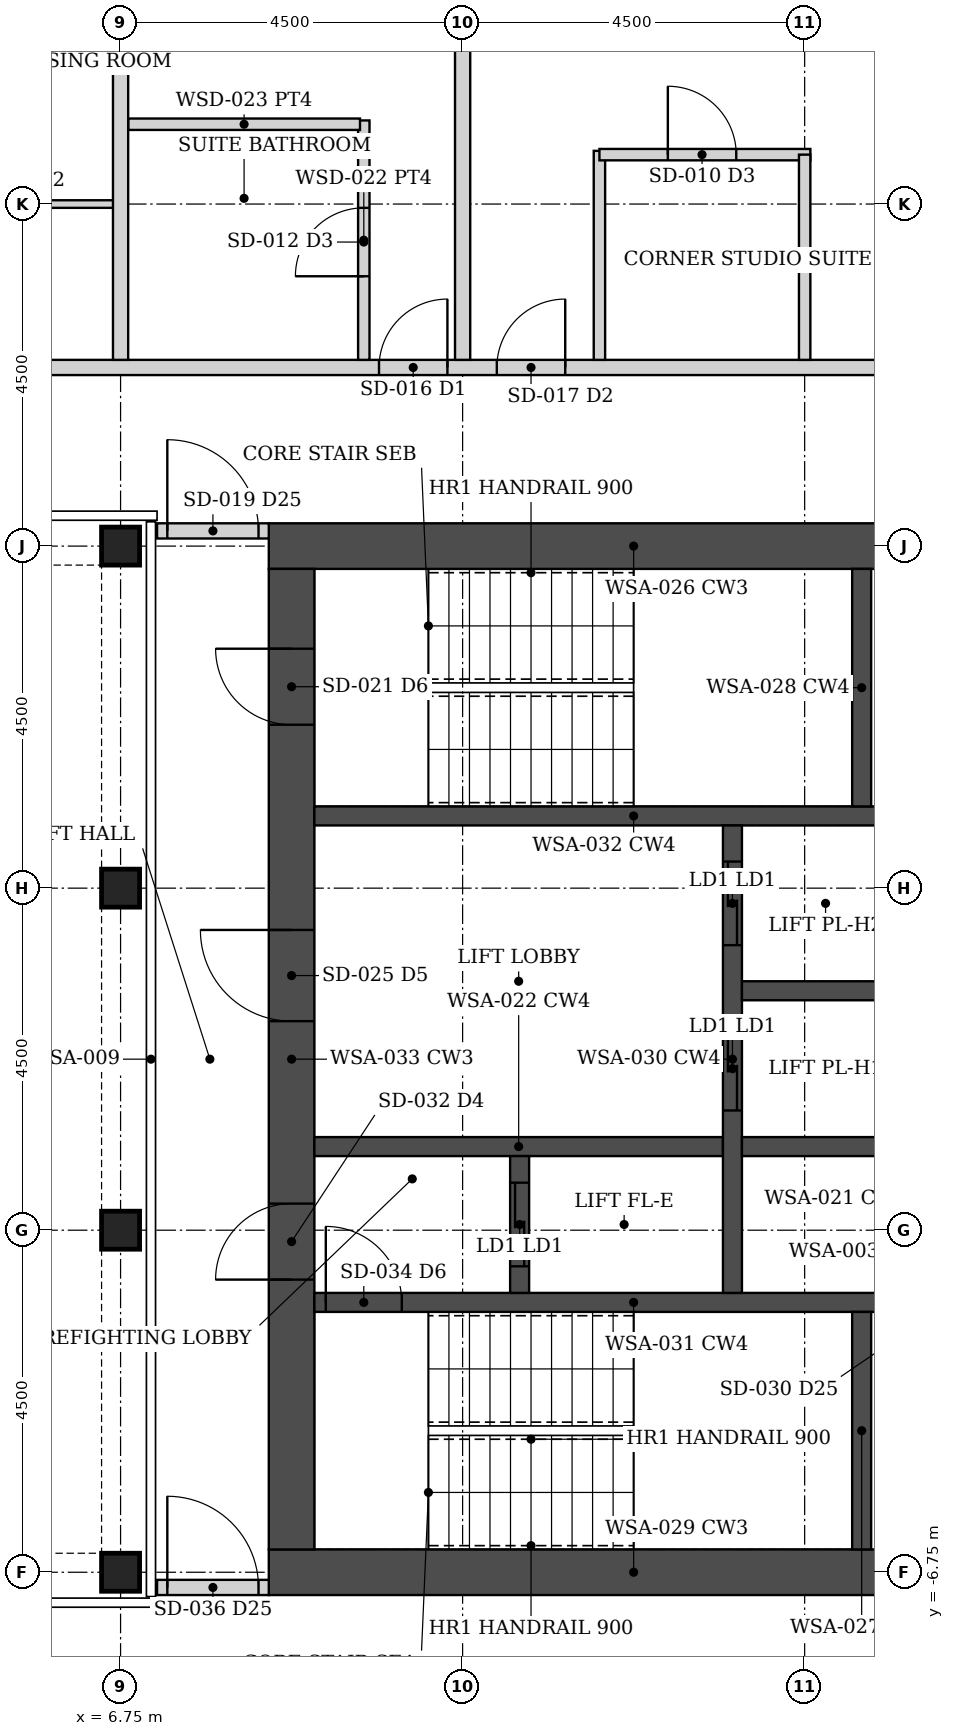
"""IFC4 building model, lengths in metres.
Left out: names, types, materials, properties, quantities, classifications, styles, units other than length and angle.
Written with IfcOpenShell. Run it as: python <this file> out.ifc"""

import sys

from ifc_helpers import new_model, si_unit, direction, frame, frame_2d, origin, origin_2d, place, context, subcontext, project, spatial, rectangle, hollow_rectangle, extrude, element, fill, save


model = new_model("IFC4")
c1 = context("Model", 3, precision=1e-05, world=origin(), true_north=direction((0.0, 1.0)))
c2 = subcontext(c1, "Body", "Model", "MODEL_VIEW")
j1 = project(units=[si_unit("LENGTHUNIT", "METRE"), si_unit("PLANEANGLEUNIT", "RADIAN")], contexts=[c1])
p1 = place(None, origin())
s1 = spatial("IfcSite", under=j1, at=p1, CompositionType="ELEMENT")
p2 = place(p1, origin())
s2 = spatial("IfcBuilding", under=s1, at=p2, CompositionType="ELEMENT")
p3 = place(p2, frame((0.0, 0.0, 234.55)))
s3 = spatial("IfcBuildingStorey", under=s2, at=p3, CompositionType="ELEMENT", Elevation=234.55)
for number, where, z_axis, x_axis in (
    (1, (6.75, -6.75, 0.0), (0.0, 0.0, 1.0), (1.0, 0.0, 0.0)),
    (2, (6.75, -2.25, 0.0), (0.0, 0.0, 1.0), (1.0, 0.0, 0.0)),
    (3, (6.75, 2.25, 0.0), (0.0, 0.0, 1.0), (1.0, 0.0, 0.0)),
    (4, (6.75, 6.75, 0.0), (0.0, 0.0, 1.0), (1.0, 0.0, 0.0)),
):
    element("IfcColumn", number, at=place(p3, frame(where, z_axis=z_axis, x_axis=x_axis)), inside=s3, PredefinedType="COLUMN", context=c2, shape_type="SweptSolid", body=[
        extrude(hollow_rectangle(XDim=0.5, YDim=0.5, WallThickness=0.025, at=origin_2d()), origin(), (0.0, 0.0, 1.0), 3.75),
    ])
for number, where, z_axis, x_axis in (
    (5, (8.7, -6.75, 0.0), (0.0, 0.0, 1.0), (1.0, 0.0, 0.0)),
    (6, (8.7, 6.75, 0.0), (0.0, 0.0, 1.0), (1.0, 0.0, 0.0)),
):
    element("IfcWall", number, at=place(p3, frame(where, z_axis=z_axis, x_axis=x_axis)), inside=s3, PredefinedType="SHEAR", context=c2, shape_type="SweptSolid", body=[
        extrude(rectangle(XDim=9.6, YDim=0.6, at=frame_2d((4.8, 0.0))), origin(), (0.0, 0.0, 1.0), 3.75),
    ])
p4 = place(p3, frame((9.0, -6.45, 0.0), z_axis=(0.0, 0.0, 1.0), x_axis=(0.0, 1.0, 0.0)))
e7 = element("IfcWall", 7, at=p4, inside=s3, PredefinedType="SHEAR", context=c2, shape_type="SweptSolid", body=[
    extrude(rectangle(XDim=12.9, YDim=0.6, at=frame_2d((6.45, 0.0))), origin(), (0.0, 0.0, 1.0), 3.75),
])
p5 = place(p4, frame((3.55, 0.0, 0.0)))
e8 = element("IfcOpeningElement", 8, at=p5, cuts=e7, PredefinedType="OPENING", context=c2, shape_type="SweptSolid", body=[
    extrude(rectangle(XDim=1.0, YDim=2.1, at=frame_2d((0.5, 1.05))), frame((0.0, 0.31, 0.0), z_axis=(0.0, -1.0, 0.0), x_axis=(1.0, 0.0, 0.0)), (0.0, 0.0, 1.0), 0.62),
])
p6 = place(p4, frame((6.95, 0.0, 0.0)))
e9 = element("IfcOpeningElement", 9, at=p6, cuts=e7, PredefinedType="OPENING", context=c2, shape_type="SweptSolid", body=[
    extrude(rectangle(XDim=1.2, YDim=2.1, at=frame_2d((0.6, 1.05))), frame((0.0, 0.31, 0.0), z_axis=(0.0, -1.0, 0.0), x_axis=(1.0, 0.0, 0.0)), (0.0, 0.0, 1.0), 0.62),
])
p7 = place(p4, frame((10.85, 0.0, 0.0)))
e10 = element("IfcOpeningElement", 10, at=p7, cuts=e7, PredefinedType="OPENING", context=c2, shape_type="SweptSolid", body=[
    extrude(rectangle(XDim=1.0, YDim=2.1, at=frame_2d((0.5, 1.05))), frame((0.0, 0.31, 0.0), z_axis=(0.0, -1.0, 0.0), x_axis=(1.0, 0.0, 0.0)), (0.0, 0.0, 1.0), 0.62),
])
p8 = place(p3, frame((9.3, -3.2, 0.0), z_axis=(0.0, 0.0, 1.0), x_axis=(1.0, 0.0, 0.0)))
e11 = element("IfcWall", 11, at=p8, inside=s3, PredefinedType="SHEAR", context=c2, shape_type="SweptSolid", body=[
    extrude(rectangle(XDim=8.4, YDim=0.25, at=frame_2d((4.2, 0.0))), origin(), (0.0, 0.0, 1.0), 3.75),
])
p9 = place(p8, frame((0.15, 0.0, 0.0)))
e12 = element("IfcOpeningElement", 12, at=p9, cuts=e11, PredefinedType="OPENING", context=c2, shape_type="SweptSolid", body=[
    extrude(rectangle(XDim=1.0, YDim=2.1, at=frame_2d((0.5, 1.05))), frame((0.0, 0.135, 0.0), z_axis=(0.0, -1.0, 0.0), x_axis=(1.0, 0.0, 0.0)), (0.0, 0.0, 1.0), 0.27),
])
p10 = place(p3, frame((9.3, 3.2, 0.0), z_axis=(0.0, 0.0, 1.0), x_axis=(1.0, 0.0, 0.0)))
e13 = element("IfcWall", 13, at=p10, inside=s3, PredefinedType="SHEAR", context=c2, shape_type="SweptSolid", body=[
    extrude(rectangle(XDim=8.4, YDim=0.25, at=frame_2d((4.2, 0.0))), origin(), (0.0, 0.0, 1.0), 3.75),
])
for number, where, z_axis, x_axis in (
    (14, (16.5, -6.45, 0.0), (0.0, 0.0, 1.0), (0.0, 1.0, 0.0)),
    (15, (16.5, 3.325, 0.0), (0.0, 0.0, 1.0), (0.0, 1.0, 0.0)),
):
    element("IfcWall", number, at=place(p3, frame(where, z_axis=z_axis, x_axis=x_axis)), inside=s3, PredefinedType="SHEAR", context=c2, shape_type="SweptSolid", body=[
        extrude(rectangle(XDim=3.125, YDim=0.25, at=frame_2d((1.562, 0.0))), origin(), (0.0, 0.0, 1.0), 3.75),
    ])
p11 = place(p3, frame((9.3, -1.15, 0.0), z_axis=(0.0, 0.0, 1.0), x_axis=(1.0, 0.0, 0.0)))
e16 = element("IfcWall", 16, at=p11, inside=s3, PredefinedType="SHEAR", context=c2, shape_type="SweptSolid", body=[
    extrude(rectangle(XDim=5.375, YDim=0.25, at=frame_2d((2.688, 0.0))), origin(), (0.0, 0.0, 1.0), 3.75),
])
p12 = place(p3, frame((12.0, -3.075, 0.0), z_axis=(0.0, 0.0, 1.0), x_axis=(0.0, 1.0, 0.0)))
e17 = element("IfcWall", 17, at=p12, inside=s3, PredefinedType="SHEAR", context=c2, shape_type="SweptSolid", body=[
    extrude(rectangle(XDim=1.8, YDim=0.25, at=frame_2d((0.9, 0.0))), origin(), (0.0, 0.0, 1.0), 3.75),
])
p13 = place(p12, frame((0.35, 0.0, 0.0)))
e18 = element("IfcOpeningElement", 18, at=p13, cuts=e17, PredefinedType="OPENING", context=c2, shape_type="SweptSolid", body=[
    extrude(rectangle(XDim=1.1, YDim=2.1, at=frame_2d((0.55, 1.05))), frame((0.0, 0.135, 0.0), z_axis=(0.0, -1.0, 0.0), x_axis=(1.0, 0.0, 0.0)), (0.0, 0.0, 1.0), 0.27),
])
p14 = place(p3, frame((14.8, -3.075, 0.0), z_axis=(0.0, 0.0, 1.0), x_axis=(0.0, 1.0, 0.0)))
e19 = element("IfcWall", 19, at=p14, inside=s3, PredefinedType="SHEAR", context=c2, shape_type="SweptSolid", body=[
    extrude(rectangle(XDim=6.15, YDim=0.25, at=frame_2d((3.075, 0.0))), origin(), (0.0, 0.0, 1.0), 3.75),
])
p15 = place(p14, frame((2.4, 0.0, 0.0)))
e20 = element("IfcOpeningElement", 20, at=p15, cuts=e19, PredefinedType="OPENING", context=c2, shape_type="SweptSolid", body=[
    extrude(rectangle(XDim=1.1, YDim=2.1, at=frame_2d((0.55, 1.05))), frame((0.0, 0.135, 0.0), z_axis=(0.0, -1.0, 0.0), x_axis=(1.0, 0.0, 0.0)), (0.0, 0.0, 1.0), 0.27),
])
p16 = place(p14, frame((4.575, 0.0, 0.0)))
e21 = element("IfcOpeningElement", 21, at=p16, cuts=e19, PredefinedType="OPENING", context=c2, shape_type="SweptSolid", body=[
    extrude(rectangle(XDim=1.1, YDim=2.1, at=frame_2d((0.55, 1.05))), frame((0.0, 0.135, 0.0), z_axis=(0.0, -1.0, 0.0), x_axis=(1.0, 0.0, 0.0)), (0.0, 0.0, 1.0), 0.27),
])
for number, where, z_axis, x_axis in (
    (22, (14.925, -1.15, 0.0), (0.0, 0.0, 1.0), (1.0, 0.0, 0.0)),
    (23, (14.925, 0.9, 0.0), (0.0, 0.0, 1.0), (1.0, 0.0, 0.0)),
):
    element("IfcWall", number, at=place(p3, frame(where, z_axis=z_axis, x_axis=x_axis)), inside=s3, PredefinedType="SHEAR", context=c2, shape_type="SweptSolid", body=[
        extrude(rectangle(XDim=2.775, YDim=0.25, at=frame_2d((1.387, 0.0))), origin(), (0.0, 0.0, 1.0), 3.75),
    ])
p17 = place(p3, frame((7.23, 6.95, 0.0), z_axis=(0.0, 0.0, 1.0), x_axis=(1.0, 0.0, 0.0)))
e24 = element("IfcWall", 24, at=p17, inside=s3, PredefinedType="PARTITIONING", context=c2, shape_type="SweptSolid", body=[
    extrude(rectangle(XDim=1.47, YDim=0.2, at=frame_2d((0.735, 0.0))), origin(), (0.0, 0.0, 1.0), 2.629),
])
p18 = place(p17, frame((0.135, 0.0, 0.0)))
e25 = element("IfcOpeningElement", 25, at=p18, cuts=e24, PredefinedType="OPENING", context=c2, shape_type="SweptSolid", body=[
    extrude(rectangle(XDim=1.2, YDim=2.1, at=frame_2d((0.6, 1.05))), frame((0.0, 0.11, 0.0), z_axis=(0.0, -1.0, 0.0), x_axis=(1.0, 0.0, 0.0)), (0.0, 0.0, 1.0), 0.22),
])
p19 = place(p3, frame((7.23, -6.95, 0.0), z_axis=(0.0, 0.0, 1.0), x_axis=(1.0, 0.0, 0.0)))
e26 = element("IfcWall", 26, at=p19, inside=s3, PredefinedType="PARTITIONING", context=c2, shape_type="SweptSolid", body=[
    extrude(rectangle(XDim=1.47, YDim=0.2, at=frame_2d((0.735, 0.0))), origin(), (0.0, 0.0, 1.0), 2.629),
])
p20 = place(p19, frame((0.135, 0.0, 0.0)))
e27 = element("IfcOpeningElement", 27, at=p20, cuts=e26, PredefinedType="OPENING", context=c2, shape_type="SweptSolid", body=[
    extrude(rectangle(XDim=1.2, YDim=2.1, at=frame_2d((0.6, 1.05))), frame((0.0, 0.11, 0.0), z_axis=(0.0, -1.0, 0.0), x_axis=(1.0, 0.0, 0.0)), (0.0, 0.0, 1.0), 0.22),
])
p21 = place(p3, frame((-20.05, 9.1, 0.0), z_axis=(0.0, 0.0, 1.0), x_axis=(1.0, 0.0, 0.0)))
e28 = element("IfcWall", 28, at=p21, inside=s3, PredefinedType="PARTITIONING", context=c2, shape_type="SweptSolid", body=[
    extrude(rectangle(XDim=40.1, YDim=0.2, at=frame_2d((20.05, 0.0))), origin(), (0.0, 0.0, 1.0), 2.629),
])
p22 = place(p21, frame((9.0, 0.0, 0.0)))
e29 = element("IfcOpeningElement", 29, at=p22, cuts=e28, PredefinedType="OPENING", context=c2, shape_type="SweptSolid", body=[
    extrude(rectangle(XDim=0.9, YDim=2.1, at=frame_2d((0.45, 1.05))), frame((0.0, 0.11, 0.0), z_axis=(0.0, -1.0, 0.0), x_axis=(1.0, 0.0, 0.0)), (0.0, 0.0, 1.0), 0.22),
])
p23 = place(p21, frame((13.6, 0.0, 0.0)))
e30 = element("IfcOpeningElement", 30, at=p23, cuts=e28, PredefinedType="OPENING", context=c2, shape_type="SweptSolid", body=[
    extrude(rectangle(XDim=0.9, YDim=2.1, at=frame_2d((0.45, 1.05))), frame((0.0, 0.11, 0.0), z_axis=(0.0, -1.0, 0.0), x_axis=(1.0, 0.0, 0.0)), (0.0, 0.0, 1.0), 0.22),
])
p24 = place(p21, frame((30.2, 0.0, 0.0)))
e31 = element("IfcOpeningElement", 31, at=p24, cuts=e28, PredefinedType="OPENING", context=c2, shape_type="SweptSolid", body=[
    extrude(rectangle(XDim=0.9, YDim=2.1, at=frame_2d((0.45, 1.05))), frame((0.0, 0.11, 0.0), z_axis=(0.0, -1.0, 0.0), x_axis=(1.0, 0.0, 0.0)), (0.0, 0.0, 1.0), 0.22),
])
p25 = place(p21, frame((31.75, 0.0, 0.0)))
e32 = element("IfcOpeningElement", 32, at=p25, cuts=e28, PredefinedType="OPENING", context=c2, shape_type="SweptSolid", body=[
    extrude(rectangle(XDim=0.9, YDim=2.1, at=frame_2d((0.45, 1.05))), frame((0.0, 0.11, 0.0), z_axis=(0.0, -1.0, 0.0), x_axis=(1.0, 0.0, 0.0)), (0.0, 0.0, 1.0), 0.22),
])
p26 = place(p21, frame((7.45, 0.0, 0.0)))
e33 = element("IfcOpeningElement", 33, at=p26, cuts=e28, PredefinedType="OPENING", context=c2, shape_type="SweptSolid", body=[
    extrude(rectangle(XDim=0.9, YDim=2.1, at=frame_2d((0.45, 1.05))), frame((0.0, 0.11, 0.0), z_axis=(0.0, -1.0, 0.0), x_axis=(1.0, 0.0, 0.0)), (0.0, 0.0, 1.0), 0.22),
])
p27 = place(p3, frame((3.55, 11.25, 0.0), z_axis=(0.0, 0.0, 1.0), x_axis=(1.0, 0.0, 0.0)))
e34 = element("IfcWall", 34, at=p27, inside=s3, PredefinedType="PARTITIONING", context=c2, shape_type="SweptSolid", body=[
    extrude(rectangle(XDim=3.14, YDim=0.1, at=frame_2d((1.57, 0.0))), origin(), (0.0, 0.0, 1.0), 2.629),
])
p28 = place(p3, frame((9.95, 9.2, 0.0), z_axis=(0.0, 0.0, 1.0), x_axis=(0.0, 1.0, 0.0)))
e35 = element("IfcWall", 35, at=p28, inside=s3, PredefinedType="PARTITIONING", context=c2, shape_type="SweptSolid", body=[
    extrude(rectangle(XDim=3.15, YDim=0.15, at=frame_2d((1.575, 0.0))), origin(), (0.0, 0.0, 1.0), 2.629),
])
p29 = place(p28, frame((1.1, 0.0, 0.0)))
e36 = element("IfcOpeningElement", 36, at=p29, cuts=e35, PredefinedType="OPENING", context=c2, shape_type="SweptSolid", body=[
    extrude(rectangle(XDim=0.9, YDim=2.1, at=frame_2d((0.45, 1.05))), frame((0.0, 0.085, 0.0), z_axis=(0.0, -1.0, 0.0), x_axis=(1.0, 0.0, 0.0)), (0.0, 0.0, 1.0), 0.17),
])
p30 = place(p3, frame((6.85, 12.3, 0.0), z_axis=(0.0, 0.0, 1.0), x_axis=(1.0, 0.0, 0.0)))
e37 = element("IfcWall", 37, at=p30, inside=s3, PredefinedType="PARTITIONING", context=c2, shape_type="SweptSolid", body=[
    extrude(rectangle(XDim=3.05, YDim=0.15, at=frame_2d((1.525, 0.0))), origin(), (0.0, 0.0, 1.0), 2.629),
])
for number, where, z_axis, x_axis in (
    (38, (6.75, 9.2, 0.0), (0.0, 0.0, 1.0), (0.0, 1.0, 0.0)),
    (39, (11.25, 9.2, 0.0), (0.0, 0.0, 1.0), (0.0, 1.0, 0.0)),
):
    element("IfcWall", number, at=place(p3, frame(where, z_axis=z_axis, x_axis=x_axis)), inside=s3, PredefinedType="PARTITIONING", context=c2, shape_type="SweptSolid", body=[
        extrude(rectangle(XDim=10.7, YDim=0.2, at=frame_2d((5.35, 0.0))), origin(), (0.0, 0.0, 1.0), 2.629),
    ])
p31 = place(p3, frame((13.05, 9.2, 0.0), z_axis=(0.0, 0.0, 1.0), x_axis=(0.0, 1.0, 0.0)))
e40 = element("IfcWall", 40, at=p31, inside=s3, PredefinedType="PARTITIONING", context=c2, shape_type="SweptSolid", body=[
    extrude(rectangle(XDim=2.75, YDim=0.15, at=frame_2d((1.375, 0.0))), origin(), (0.0, 0.0, 1.0), 2.629),
])
p32 = place(p3, frame((13.05, 11.9, 0.0), z_axis=(0.0, 0.0, 1.0), x_axis=(1.0, 0.0, 0.0)))
e41 = element("IfcWall", 41, at=p32, inside=s3, PredefinedType="PARTITIONING", context=c2, shape_type="SweptSolid", body=[
    extrude(rectangle(XDim=2.775, YDim=0.15, at=frame_2d((1.387, 0.0))), origin(), (0.0, 0.0, 1.0), 2.629),
])
p33 = place(p32, frame((0.9, 0.0, 0.0)))
e42 = element("IfcOpeningElement", 42, at=p33, cuts=e41, PredefinedType="OPENING", context=c2, shape_type="SweptSolid", body=[
    extrude(rectangle(XDim=0.9, YDim=2.1, at=frame_2d((0.45, 1.05))), frame((0.0, 0.085, 0.0), z_axis=(0.0, -1.0, 0.0), x_axis=(1.0, 0.0, 0.0)), (0.0, 0.0, 1.0), 0.17),
])
p34 = place(p3, frame((15.75, 9.2, 0.0), z_axis=(0.0, 0.0, 1.0), x_axis=(0.0, 1.0, 0.0)))
e43 = element("IfcWall", 43, at=p34, inside=s3, PredefinedType="PARTITIONING", context=c2, shape_type="SweptSolid", body=[
    extrude(rectangle(XDim=2.7, YDim=0.15, at=frame_2d((1.35, 0.0))), origin(), (0.0, 0.0, 1.0), 2.629),
])
p35 = place(p18, origin())
e44 = element("IfcDoor", 44, at=p35, inside=s3, OperationType="DOUBLE_DOOR_DOUBLE_SWING", PredefinedType="DOOR", context=c2, shape_type="SweptSolid", body=[
    extrude(rectangle(XDim=1.2, YDim=2.1, at=frame_2d((0.6, 1.05))), frame((0.0, 0.025, 0.0), z_axis=(0.0, -1.0, 0.0), x_axis=(1.0, 0.0, 0.0)), (0.0, 0.0, 1.0), 0.05),
])
fill(e25, e44)
p36 = place(p20, origin())
e45 = element("IfcDoor", 45, at=p36, inside=s3, OperationType="DOUBLE_DOOR_DOUBLE_SWING", PredefinedType="DOOR", context=c2, shape_type="SweptSolid", body=[
    extrude(rectangle(XDim=1.2, YDim=2.1, at=frame_2d((0.6, 1.05))), frame((0.0, 0.025, 0.0), z_axis=(0.0, -1.0, 0.0), x_axis=(1.0, 0.0, 0.0)), (0.0, 0.0, 1.0), 0.05),
])
fill(e27, e45)
p37 = place(p24, origin())
e46 = element("IfcDoor", 46, at=p37, inside=s3, OperationType="SINGLE_SWING_RIGHT", PredefinedType="DOOR", context=c2, shape_type="SweptSolid", body=[
    extrude(rectangle(XDim=0.9, YDim=2.1, at=frame_2d((0.45, 1.05))), frame((0.0, 0.025, 0.0), z_axis=(0.0, -1.0, 0.0), x_axis=(1.0, 0.0, 0.0)), (0.0, 0.0, 1.0), 0.05),
])
fill(e31, e46)
p38 = place(p29, origin())
e47 = element("IfcDoor", 47, at=p38, inside=s3, OperationType="SINGLE_SWING_LEFT", PredefinedType="DOOR", context=c2, shape_type="SweptSolid", body=[
    extrude(rectangle(XDim=0.9, YDim=2.1, at=frame_2d((0.45, 1.05))), frame((0.0, 0.025, 0.0), z_axis=(0.0, -1.0, 0.0), x_axis=(1.0, 0.0, 0.0)), (0.0, 0.0, 1.0), 0.05),
])
fill(e36, e47)
p39 = place(p25, origin())
e48 = element("IfcDoor", 48, at=p39, inside=s3, OperationType="SINGLE_SWING_RIGHT", PredefinedType="DOOR", context=c2, shape_type="SweptSolid", body=[
    extrude(rectangle(XDim=0.9, YDim=2.1, at=frame_2d((0.45, 1.05))), frame((0.0, 0.025, 0.0), z_axis=(0.0, -1.0, 0.0), x_axis=(1.0, 0.0, 0.0)), (0.0, 0.0, 1.0), 0.05),
])
fill(e32, e48)
p40 = place(p33, origin())
e49 = element("IfcDoor", 49, at=p40, inside=s3, OperationType="SINGLE_SWING_LEFT", PredefinedType="DOOR", context=c2, shape_type="SweptSolid", body=[
    extrude(rectangle(XDim=0.9, YDim=2.1, at=frame_2d((0.45, 1.05))), frame((0.0, 0.025, 0.0), z_axis=(0.0, -1.0, 0.0), x_axis=(1.0, 0.0, 0.0)), (0.0, 0.0, 1.0), 0.05),
])
fill(e42, e49)
p41 = place(p5, origin())
e50 = element("IfcDoor", 50, at=p41, inside=s3, OperationType="SINGLE_SWING_LEFT", PredefinedType="DOOR", context=c2, shape_type="SweptSolid", body=[
    extrude(rectangle(XDim=1.0, YDim=2.1, at=frame_2d((0.5, 1.05))), frame((0.0, 0.025, 0.0), z_axis=(0.0, -1.0, 0.0), x_axis=(1.0, 0.0, 0.0)), (0.0, 0.0, 1.0), 0.05),
])
fill(e8, e50)
p42 = place(p9, origin())
e51 = element("IfcDoor", 51, at=p42, inside=s3, OperationType="SINGLE_SWING_LEFT", PredefinedType="DOOR", context=c2, shape_type="SweptSolid", body=[
    extrude(rectangle(XDim=1.0, YDim=2.1, at=frame_2d((0.5, 1.05))), frame((0.0, 0.025, 0.0), z_axis=(0.0, -1.0, 0.0), x_axis=(1.0, 0.0, 0.0)), (0.0, 0.0, 1.0), 0.05),
])
fill(e12, e51)
p43 = place(p6, origin())
e52 = element("IfcDoor", 52, at=p43, inside=s3, OperationType="SINGLE_SWING_RIGHT", PredefinedType="DOOR", context=c2, shape_type="SweptSolid", body=[
    extrude(rectangle(XDim=1.2, YDim=2.1, at=frame_2d((0.6, 1.05))), frame((0.0, 0.025, 0.0), z_axis=(0.0, -1.0, 0.0), x_axis=(1.0, 0.0, 0.0)), (0.0, 0.0, 1.0), 0.05),
])
fill(e9, e52)
p44 = place(p7, origin())
e53 = element("IfcDoor", 53, at=p44, inside=s3, OperationType="SINGLE_SWING_RIGHT", PredefinedType="DOOR", context=c2, shape_type="SweptSolid", body=[
    extrude(rectangle(XDim=1.0, YDim=2.1, at=frame_2d((0.5, 1.05))), frame((0.0, 0.025, 0.0), z_axis=(0.0, -1.0, 0.0), x_axis=(1.0, 0.0, 0.0)), (0.0, 0.0, 1.0), 0.05),
])
fill(e10, e53)
p45 = place(p13, origin())
e54 = element("IfcDoor", 54, at=p45, inside=s3, OperationType="DOUBLE_DOOR_SLIDING", PredefinedType="DOOR", context=c2, shape_type="SweptSolid", body=[
    extrude(rectangle(XDim=1.1, YDim=2.1, at=frame_2d((0.55, 1.05))), frame((0.0, 0.025, 0.0), z_axis=(0.0, -1.0, 0.0), x_axis=(1.0, 0.0, 0.0)), (0.0, 0.0, 1.0), 0.05),
])
fill(e18, e54)
p46 = place(p15, origin())
e55 = element("IfcDoor", 55, at=p46, inside=s3, OperationType="DOUBLE_DOOR_SLIDING", PredefinedType="DOOR", context=c2, shape_type="SweptSolid", body=[
    extrude(rectangle(XDim=1.1, YDim=2.1, at=frame_2d((0.55, 1.05))), frame((0.0, 0.025, 0.0), z_axis=(0.0, -1.0, 0.0), x_axis=(1.0, 0.0, 0.0)), (0.0, 0.0, 1.0), 0.05),
])
fill(e20, e55)
p47 = place(p16, origin())
e56 = element("IfcDoor", 56, at=p47, inside=s3, OperationType="DOUBLE_DOOR_SLIDING", PredefinedType="DOOR", context=c2, shape_type="SweptSolid", body=[
    extrude(rectangle(XDim=1.1, YDim=2.1, at=frame_2d((0.55, 1.05))), frame((0.0, 0.025, 0.0), z_axis=(0.0, -1.0, 0.0), x_axis=(1.0, 0.0, 0.0)), (0.0, 0.0, 1.0), 0.05),
])
fill(e21, e56)
save(model, sys.argv[1])
